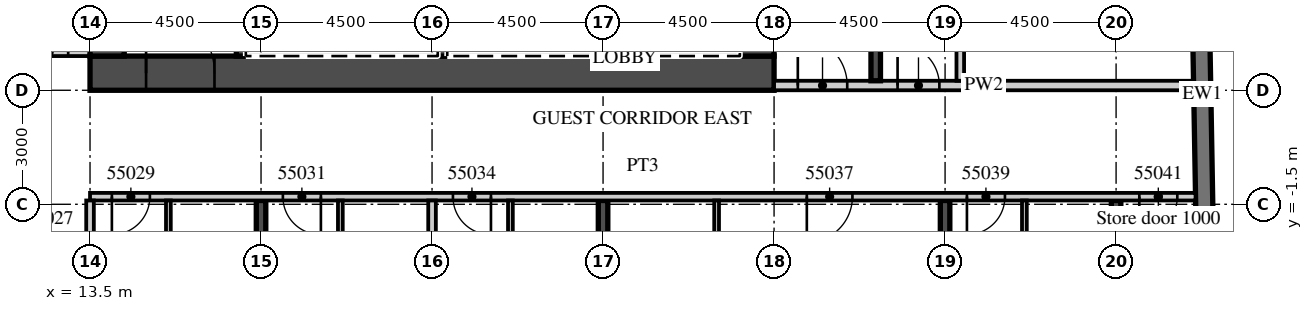
"""IFC4 building model, lengths in metres.
Left out: names, types, materials, properties, quantities, classifications, styles, units other than length and angle.
Written with IfcOpenShell. Run it as: python <this file> out.ifc"""

import sys

from ifc_helpers import new_model, si_unit, direction, frame, frame_2d, origin, place, context, subcontext, project, spatial, rectangle, extrude, element, fill, save


model = new_model("IFC4")
c1 = context("Model", 3, precision=1e-05, world=origin(), true_north=direction((0.0, 1.0)))
c2 = subcontext(c1, "Body", "Model", "MODEL_VIEW")
j1 = project(units=[si_unit("LENGTHUNIT", "METRE"), si_unit("PLANEANGLEUNIT", "RADIAN")], contexts=[c1])
p1 = place(None, origin())
s1 = spatial("IfcSite", under=j1, at=p1, CompositionType="ELEMENT")
p2 = place(p1, origin())
s2 = spatial("IfcBuilding", under=s1, at=p2, CompositionType="ELEMENT")
p3 = place(p2, frame((0.0, 0.0, 227.6)))
s3 = spatial("IfcBuildingStorey", under=s2, at=p3, CompositionType="ELEMENT", Elevation=227.6)
p4 = place(p3, frame((18.0, -19.079, 0.0), z_axis=(0.0, 0.0, 1.0), x_axis=(0.0, 1.0, 0.0)))
e1 = element("IfcWall", 1, at=p4, inside=s3, PredefinedType="SHEAR", context=c2, shape_type="SweptSolid", body=[
    extrude(rectangle(XDim=17.679, YDim=0.25, at=frame_2d((8.84, 0.0))), origin(), (0.0, 0.0, 1.0), 3.3),
])
p5 = place(p3, frame((27.0, -18.922, 0.0), z_axis=(0.0, 0.0, 1.0), x_axis=(0.0, 1.0, 0.0)))
e2 = element("IfcWall", 2, at=p5, inside=s3, PredefinedType="SHEAR", context=c2, shape_type="SweptSolid", body=[
    extrude(rectangle(XDim=17.522, YDim=0.25, at=frame_2d((8.761, 0.0))), origin(), (0.0, 0.0, 1.0), 3.3),
])
p6 = place(p3, frame((36.0, -18.765, 0.0), z_axis=(0.0, 0.0, 1.0), x_axis=(0.0, 1.0, 0.0)))
e3 = element("IfcWall", 3, at=p6, inside=s3, PredefinedType="SHEAR", context=c2, shape_type="SweptSolid", body=[
    extrude(rectangle(XDim=17.365, YDim=0.25, at=frame_2d((8.683, 0.0))), origin(), (0.0, 0.0, 1.0), 3.3),
])
p7 = place(p3, frame((40.5, -18.325, 0.0), z_axis=(0.0, 0.0, 1.0), x_axis=(0.0, 1.0, 0.0)))
e4 = element("IfcWall", 4, at=p7, inside=s3, PredefinedType="SHEAR", context=c2, shape_type="SweptSolid", body=[
    extrude(rectangle(XDim=16.925, YDim=0.25, at=frame_2d((8.463, 0.0))), origin(), (0.0, 0.0, 1.0), 3.3),
])
p8 = place(p3, frame((43.057, -15.103, 0.0), z_axis=(0.0, 0.0, 1.0), x_axis=(-0.017452408953, 0.999847695112, 0.0)))
e5 = element("IfcWall", 5, at=p8, inside=s3, PredefinedType="SOLIDWALL", context=c2, shape_type="SweptSolid", body=[
    extrude(rectangle(XDim=33.0, YDim=0.45, at=frame_2d((16.5, 0.0))), origin(), (0.0, 0.0, 1.0), 3.02),
])
p9 = place(p3, frame((-13.5, 2.5, 0.0), z_axis=(0.0, 0.0, 1.0), x_axis=(1.0, 0.0, 0.0)))
e6 = element("IfcWall", 6, at=p9, inside=s3, PredefinedType="PARTITIONING", context=c2, shape_type="SweptSolid", body=[
    extrude(rectangle(XDim=27.0, YDim=0.2, at=frame_2d((13.5, 0.0))), origin(), (0.0, 0.0, 1.0), 3.02),
])
p10 = place(p9, frame((2.925, 0.0, 0.0)))
e7 = element("IfcOpeningElement", 7, at=p10, cuts=e6, PredefinedType="OPENING", context=c2, shape_type="SweptSolid", body=[
    extrude(rectangle(XDim=1.0, YDim=2.1, at=frame_2d((0.5, 1.05))), frame((0.0, 0.11, 0.0), z_axis=(0.0, -1.0, 0.0), x_axis=(1.0, 0.0, 0.0)), (0.0, 0.0, 1.0), 0.22),
])
p11 = place(p9, frame((6.938, 0.0, 0.0)))
e8 = element("IfcOpeningElement", 8, at=p11, cuts=e6, PredefinedType="OPENING", context=c2, shape_type="SweptSolid", body=[
    extrude(rectangle(XDim=1.2, YDim=2.1, at=frame_2d((0.6, 1.05))), frame((0.0, 0.11, 0.0), z_axis=(0.0, -1.0, 0.0), x_axis=(1.0, 0.0, 0.0)), (0.0, 0.0, 1.0), 0.22),
])
p12 = place(p9, frame((14.075, 0.0, 0.0)))
e9 = element("IfcOpeningElement", 9, at=p12, cuts=e6, PredefinedType="OPENING", context=c2, shape_type="SweptSolid", body=[
    extrude(rectangle(XDim=1.0, YDim=2.1, at=frame_2d((0.5, 1.05))), frame((0.0, 0.11, 0.0), z_axis=(0.0, -1.0, 0.0), x_axis=(1.0, 0.0, 0.0)), (0.0, 0.0, 1.0), 0.22),
])
p13 = place(p9, frame((20.925, 0.0, 0.0)))
e10 = element("IfcOpeningElement", 10, at=p13, cuts=e6, PredefinedType="OPENING", context=c2, shape_type="SweptSolid", body=[
    extrude(rectangle(XDim=1.0, YDim=2.1, at=frame_2d((0.5, 1.05))), frame((0.0, 0.11, 0.0), z_axis=(0.0, -1.0, 0.0), x_axis=(1.0, 0.0, 0.0)), (0.0, 0.0, 1.0), 0.22),
])
p14 = place(p9, frame((25.425, 0.0, 0.0)))
e11 = element("IfcOpeningElement", 11, at=p14, cuts=e6, PredefinedType="OPENING", context=c2, shape_type="SweptSolid", body=[
    extrude(rectangle(XDim=1.0, YDim=2.1, at=frame_2d((0.5, 1.05))), frame((0.0, 0.11, 0.0), z_axis=(0.0, -1.0, 0.0), x_axis=(1.0, 0.0, 0.0)), (0.0, 0.0, 1.0), 0.22),
])
p15 = place(p3, frame((13.5, -1.3, 0.0), z_axis=(0.0, 0.0, 1.0), x_axis=(1.0, 0.0, 0.0)))
e12 = element("IfcWall", 12, at=p15, inside=s3, PredefinedType="PARTITIONING", context=c2, shape_type="SweptSolid", body=[
    extrude(rectangle(XDim=29.091, YDim=0.2, at=frame_2d((14.545, 0.0))), origin(), (0.0, 0.0, 1.0), 3.02),
])
p16 = place(p15, frame((0.575, 0.0, 0.0)))
e13 = element("IfcOpeningElement", 13, at=p16, cuts=e12, PredefinedType="OPENING", context=c2, shape_type="SweptSolid", body=[
    extrude(rectangle(XDim=1.0, YDim=2.1, at=frame_2d((0.5, 1.05))), frame((0.0, 0.11, 0.0), z_axis=(0.0, -1.0, 0.0), x_axis=(1.0, 0.0, 0.0)), (0.0, 0.0, 1.0), 0.22),
])
p17 = place(p15, frame((5.075, 0.0, 0.0)))
e14 = element("IfcOpeningElement", 14, at=p17, cuts=e12, PredefinedType="OPENING", context=c2, shape_type="SweptSolid", body=[
    extrude(rectangle(XDim=1.0, YDim=2.1, at=frame_2d((0.5, 1.05))), frame((0.0, 0.11, 0.0), z_axis=(0.0, -1.0, 0.0), x_axis=(1.0, 0.0, 0.0)), (0.0, 0.0, 1.0), 0.22),
])
p18 = place(p15, frame((9.55, 0.0, 0.0)))
e15 = element("IfcOpeningElement", 15, at=p18, cuts=e12, PredefinedType="OPENING", context=c2, shape_type="SweptSolid", body=[
    extrude(rectangle(XDim=1.0, YDim=2.1, at=frame_2d((0.5, 1.05))), frame((0.0, 0.11, 0.0), z_axis=(0.0, -1.0, 0.0), x_axis=(1.0, 0.0, 0.0)), (0.0, 0.0, 1.0), 0.22),
])
p19 = place(p15, frame((18.862, 0.0, 0.0)))
e16 = element("IfcOpeningElement", 16, at=p19, cuts=e12, PredefinedType="OPENING", context=c2, shape_type="SweptSolid", body=[
    extrude(rectangle(XDim=1.2, YDim=2.1, at=frame_2d((0.6, 1.05))), frame((0.0, 0.11, 0.0), z_axis=(0.0, -1.0, 0.0), x_axis=(1.0, 0.0, 0.0)), (0.0, 0.0, 1.0), 0.22),
])
p20 = place(p15, frame((23.075, 0.0, 0.0)))
e17 = element("IfcOpeningElement", 17, at=p20, cuts=e12, PredefinedType="OPENING", context=c2, shape_type="SweptSolid", body=[
    extrude(rectangle(XDim=1.0, YDim=2.1, at=frame_2d((0.5, 1.05))), frame((0.0, 0.11, 0.0), z_axis=(0.0, -1.0, 0.0), x_axis=(1.0, 0.0, 0.0)), (0.0, 0.0, 1.0), 0.22),
])
p21 = place(p15, frame((27.611, 0.0, 0.0)))
e18 = element("IfcOpeningElement", 18, at=p21, cuts=e12, PredefinedType="OPENING", context=c2, shape_type="SweptSolid", body=[
    extrude(rectangle(XDim=1.0, YDim=2.4, at=frame_2d((0.5, 1.2))), frame((0.0, 0.11, 0.0), z_axis=(0.0, -1.0, 0.0), x_axis=(1.0, 0.0, 0.0)), (0.0, 0.0, 1.0), 0.22),
])
p22 = place(p3, frame((13.5, -19.17, 0.0), z_axis=(0.0, 0.0, 1.0), x_axis=(0.0, 1.0, 0.0)))
e19 = element("IfcWall", 19, at=p22, inside=s3, PredefinedType="PARTITIONING", context=c2, shape_type="SweptSolid", body=[
    extrude(rectangle(XDim=17.77, YDim=0.2, at=frame_2d((8.885, 0.0))), origin(), (0.0, 0.0, 1.0), 3.02),
])
p23 = place(p3, frame((15.562, -7.125, 0.0), z_axis=(0.0, 0.0, 1.0), x_axis=(0.0, 1.0, 0.0)))
e20 = element("IfcWall", 20, at=p23, inside=s3, PredefinedType="PARTITIONING", context=c2, shape_type="SweptSolid", body=[
    extrude(rectangle(XDim=5.725, YDim=0.125, at=frame_2d((2.863, 0.0))), origin(), (0.0, 0.0, 1.0), 3.02),
])
p24 = place(p23, frame((2.375, 0.0, 0.0)))
e21 = element("IfcOpeningElement", 21, at=p24, cuts=e20, PredefinedType="OPENING", context=c2, shape_type="SweptSolid", body=[
    extrude(rectangle(XDim=0.9, YDim=2.1, at=frame_2d((0.45, 1.05))), frame((0.0, 0.073, 0.0), z_axis=(0.0, -1.0, 0.0), x_axis=(1.0, 0.0, 0.0)), (0.0, 0.0, 1.0), 0.145),
])
p25 = place(p3, frame((22.5, -19.013, 0.0), z_axis=(0.0, 0.0, 1.0), x_axis=(0.0, 1.0, 0.0)))
e22 = element("IfcWall", 22, at=p25, inside=s3, PredefinedType="PARTITIONING", context=c2, shape_type="SweptSolid", body=[
    extrude(rectangle(XDim=17.613, YDim=0.2, at=frame_2d((8.807, 0.0))), origin(), (0.0, 0.0, 1.0), 3.02),
])
p26 = place(p3, frame((20.087, -7.125, 0.0), z_axis=(0.0, 0.0, 1.0), x_axis=(0.0, 1.0, 0.0)))
e23 = element("IfcWall", 23, at=p26, inside=s3, PredefinedType="PARTITIONING", context=c2, shape_type="SweptSolid", body=[
    extrude(rectangle(XDim=5.725, YDim=0.125, at=frame_2d((2.863, 0.0))), origin(), (0.0, 0.0, 1.0), 3.02),
])
p27 = place(p26, frame((2.375, 0.0, 0.0)))
e24 = element("IfcOpeningElement", 24, at=p27, cuts=e23, PredefinedType="OPENING", context=c2, shape_type="SweptSolid", body=[
    extrude(rectangle(XDim=0.9, YDim=2.1, at=frame_2d((0.45, 1.05))), frame((0.0, 0.073, 0.0), z_axis=(0.0, -1.0, 0.0), x_axis=(1.0, 0.0, 0.0)), (0.0, 0.0, 1.0), 0.145),
])
p28 = place(p3, frame((24.562, -7.125, 0.0), z_axis=(0.0, 0.0, 1.0), x_axis=(0.0, 1.0, 0.0)))
e25 = element("IfcWall", 25, at=p28, inside=s3, PredefinedType="PARTITIONING", context=c2, shape_type="SweptSolid", body=[
    extrude(rectangle(XDim=5.725, YDim=0.125, at=frame_2d((2.863, 0.0))), origin(), (0.0, 0.0, 1.0), 3.02),
])
p29 = place(p28, frame((2.375, 0.0, 0.0)))
e26 = element("IfcOpeningElement", 26, at=p29, cuts=e25, PredefinedType="OPENING", context=c2, shape_type="SweptSolid", body=[
    extrude(rectangle(XDim=0.9, YDim=2.1, at=frame_2d((0.45, 1.05))), frame((0.0, 0.073, 0.0), z_axis=(0.0, -1.0, 0.0), x_axis=(1.0, 0.0, 0.0)), (0.0, 0.0, 1.0), 0.145),
])
p30 = place(p3, frame((29.988, -7.125, 0.0), z_axis=(0.0, 0.0, 1.0), x_axis=(0.0, 1.0, 0.0)))
e27 = element("IfcWall", 27, at=p30, inside=s3, PredefinedType="PARTITIONING", context=c2, shape_type="SweptSolid", body=[
    extrude(rectangle(XDim=5.725, YDim=0.125, at=frame_2d((2.863, 0.0))), origin(), (0.0, 0.0, 1.0), 3.02),
])
p31 = place(p30, frame((2.375, 0.0, 0.0)))
e28 = element("IfcOpeningElement", 28, at=p31, cuts=e27, PredefinedType="OPENING", context=c2, shape_type="SweptSolid", body=[
    extrude(rectangle(XDim=0.9, YDim=2.1, at=frame_2d((0.45, 1.05))), frame((0.0, 0.073, 0.0), z_axis=(0.0, -1.0, 0.0), x_axis=(1.0, 0.0, 0.0)), (0.0, 0.0, 1.0), 0.145),
])
p32 = place(p3, frame((38.087, -7.125, 0.0), z_axis=(0.0, 0.0, 1.0), x_axis=(0.0, 1.0, 0.0)))
e29 = element("IfcWall", 29, at=p32, inside=s3, PredefinedType="PARTITIONING", context=c2, shape_type="SweptSolid", body=[
    extrude(rectangle(XDim=5.725, YDim=0.125, at=frame_2d((2.863, 0.0))), origin(), (0.0, 0.0, 1.0), 3.02),
])
p33 = place(p32, frame((2.375, 0.0, 0.0)))
e30 = element("IfcOpeningElement", 30, at=p33, cuts=e29, PredefinedType="OPENING", context=c2, shape_type="SweptSolid", body=[
    extrude(rectangle(XDim=0.9, YDim=2.1, at=frame_2d((0.45, 1.05))), frame((0.0, 0.073, 0.0), z_axis=(0.0, -1.0, 0.0), x_axis=(1.0, 0.0, 0.0)), (0.0, 0.0, 1.0), 0.145),
])
p34 = place(p3, frame((13.5, 1.95, 0.0), z_axis=(0.0, 0.0, 1.0), x_axis=(1.0, 0.0, 0.0)))
e31 = element("IfcWall", 31, at=p34, inside=s3, PredefinedType="SHEAR", context=c2, shape_type="SweptSolid", body=[
    extrude(rectangle(XDim=18.0, YDim=0.9, at=frame_2d((9.0, 0.0))), origin(), (0.0, 0.0, 1.0), 3.02),
])
p35 = place(p34, frame((1.475, 0.0, 0.0)))
e32 = element("IfcOpeningElement", 32, at=p35, cuts=e31, PredefinedType="OPENING", context=c2, shape_type="SweptSolid", body=[
    extrude(rectangle(XDim=1.8, YDim=2.1, at=frame_2d((0.9, 1.05))), frame((0.0, 0.46, 0.0), z_axis=(0.0, -1.0, 0.0), x_axis=(1.0, 0.0, 0.0)), (0.0, 0.0, 1.0), 0.92),
])
p36 = place(p3, frame((31.05, 2.4, 0.0), z_axis=(0.0, 0.0, 1.0), x_axis=(0.0, 1.0, 0.0)))
e33 = element("IfcWall", 33, at=p36, inside=s3, PredefinedType="SHEAR", context=c2, shape_type="SweptSolid", body=[
    extrude(rectangle(XDim=12.8, YDim=0.9, at=frame_2d((6.4, 0.0))), origin(), (0.0, 0.0, 1.0), 3.02),
])
p37 = place(p36, frame((0.2, 0.0, 0.0)))
e34 = element("IfcOpeningElement", 34, at=p37, cuts=e33, PredefinedType="OPENING", context=c2, shape_type="SweptSolid", body=[
    extrude(rectangle(XDim=1.1, YDim=2.1, at=frame_2d((0.55, 1.05))), frame((0.0, 0.46, 0.0), z_axis=(0.0, -1.0, 0.0), x_axis=(1.0, 0.0, 0.0)), (0.0, 0.0, 1.0), 0.92),
])
p38 = place(p3, frame((13.95, 2.4, 0.0), z_axis=(0.0, 0.0, 1.0), x_axis=(0.0, 1.0, 0.0)))
e35 = element("IfcWall", 35, at=p38, inside=s3, PredefinedType="SHEAR", context=c2, shape_type="SweptSolid", body=[
    extrude(rectangle(XDim=12.2, YDim=0.9, at=frame_2d((6.1, 0.0))), origin(), (0.0, 0.0, 1.0), 3.02),
])
p39 = place(p3, frame((17.475, 2.4, 0.0), z_axis=(0.0, 0.0, 1.0), x_axis=(0.0, 1.0, 0.0)))
e36 = element("IfcWall", 36, at=p39, inside=s3, PredefinedType="SHEAR", context=c2, shape_type="SweptSolid", body=[
    extrude(rectangle(XDim=3.15, YDim=0.25, at=frame_2d((1.575, 0.0))), origin(), (0.0, 0.0, 1.0), 3.02),
])
for number, where, z_axis, x_axis in (
    (37, (27.975, 2.4, 0.0), (0.0, 0.0, 1.0), (0.0, 1.0, 0.0)),
    (38, (22.775, 2.4, 0.0), (0.0, 0.0, 1.0), (0.0, 1.0, 0.0)),
):
    element("IfcWall", number, at=place(p3, frame(where, z_axis=z_axis, x_axis=x_axis)), inside=s3, PredefinedType="SHEAR", context=c2, shape_type="SweptSolid", body=[
        extrude(rectangle(XDim=2.9, YDim=0.25, at=frame_2d((1.45, 0.0))), origin(), (0.0, 0.0, 1.0), 3.02),
    ])
p40 = place(p3, frame((31.5, 1.625, 0.0), z_axis=(0.0, 0.0, 1.0), x_axis=(1.0, 0.0, 0.0)))
e39 = element("IfcWall", 39, at=p40, inside=s3, PredefinedType="PARTITIONING", context=c2, shape_type="SweptSolid", body=[
    extrude(rectangle(XDim=11.04, YDim=0.25, at=frame_2d((5.52, 0.0))), origin(), (0.0, 0.0, 1.0), 3.02),
])
p41 = place(p40, frame((0.625, 0.0, 0.0)))
e40 = element("IfcOpeningElement", 40, at=p41, cuts=e39, PredefinedType="OPENING", context=c2, shape_type="SweptSolid", body=[
    extrude(rectangle(XDim=1.3, YDim=2.1, at=frame_2d((0.65, 1.05))), frame((0.0, 0.135, 0.0), z_axis=(0.0, -1.0, 0.0), x_axis=(1.0, 0.0, 0.0)), (0.0, 0.0, 1.0), 0.27),
])
p42 = place(p40, frame((3.25, 0.0, 0.0)))
e41 = element("IfcOpeningElement", 41, at=p42, cuts=e39, PredefinedType="OPENING", context=c2, shape_type="SweptSolid", body=[
    extrude(rectangle(XDim=1.1, YDim=2.1, at=frame_2d((0.55, 1.05))), frame((0.0, 0.135, 0.0), z_axis=(0.0, -1.0, 0.0), x_axis=(1.0, 0.0, 0.0)), (0.0, 0.0, 1.0), 0.27),
])
p43 = place(p3, frame((34.175, 1.75, 0.0), z_axis=(0.0, 0.0, 1.0), x_axis=(0.0, 1.0, 0.0)))
e42 = element("IfcWall", 42, at=p43, inside=s3, PredefinedType="SHEAR", context=c2, shape_type="SweptSolid", body=[
    extrude(rectangle(XDim=8.35, YDim=0.25, at=frame_2d((4.175, 0.0))), origin(), (0.0, 0.0, 1.0), 3.02),
])
p44 = place(p3, frame((36.4, 1.75, 0.0), z_axis=(0.0, 0.0, 1.0), x_axis=(0.0, 1.0, 0.0)))
e43 = element("IfcWall", 43, at=p44, inside=s3, PredefinedType="PARTITIONING", context=c2, shape_type="SweptSolid", body=[
    extrude(rectangle(XDim=15.95, YDim=0.2, at=frame_2d((7.975, 0.0))), origin(), (0.0, 0.0, 1.0), 3.02),
])
p45 = place(p44, frame((14.7, 0.0, 0.0)))
e44 = element("IfcOpeningElement", 44, at=p45, cuts=e43, PredefinedType="OPENING", context=c2, shape_type="SweptSolid", body=[
    extrude(rectangle(XDim=0.9, YDim=2.1, at=frame_2d((0.45, 1.05))), frame((0.0, 0.11, 0.0), z_axis=(0.0, -1.0, 0.0), x_axis=(1.0, 0.0, 0.0)), (0.0, 0.0, 1.0), 0.22),
])
p46 = place(p14, origin())
e45 = element("IfcDoor", 45, at=p46, inside=s3, OperationType="SINGLE_SWING_RIGHT", PredefinedType="DOOR", context=c2, shape_type="SweptSolid", body=[
    extrude(rectangle(XDim=1.0, YDim=2.1, at=frame_2d((0.5, 1.05))), frame((0.0, 0.025, 0.0), z_axis=(0.0, -1.0, 0.0), x_axis=(1.0, 0.0, 0.0)), (0.0, 0.0, 1.0), 0.05),
])
fill(e11, e45)
p47 = place(p16, origin())
e46 = element("IfcDoor", 46, at=p47, inside=s3, OperationType="SINGLE_SWING_LEFT", PredefinedType="DOOR", context=c2, shape_type="SweptSolid", body=[
    extrude(rectangle(XDim=1.0, YDim=2.1, at=frame_2d((0.5, 1.05))), frame((0.0, 0.025, 0.0), z_axis=(0.0, -1.0, 0.0), x_axis=(1.0, 0.0, 0.0)), (0.0, 0.0, 1.0), 0.05),
])
fill(e13, e46)
p48 = place(p17, origin())
e47 = element("IfcDoor", 47, at=p48, inside=s3, OperationType="SINGLE_SWING_RIGHT", PredefinedType="DOOR", context=c2, shape_type="SweptSolid", body=[
    extrude(rectangle(XDim=1.0, YDim=2.1, at=frame_2d((0.5, 1.05))), frame((0.0, 0.025, 0.0), z_axis=(0.0, -1.0, 0.0), x_axis=(1.0, 0.0, 0.0)), (0.0, 0.0, 1.0), 0.05),
])
fill(e14, e47)
p49 = place(p18, origin())
e48 = element("IfcDoor", 48, at=p49, inside=s3, OperationType="SINGLE_SWING_RIGHT", PredefinedType="DOOR", context=c2, shape_type="SweptSolid", body=[
    extrude(rectangle(XDim=1.0, YDim=2.1, at=frame_2d((0.5, 1.05))), frame((0.0, 0.025, 0.0), z_axis=(0.0, -1.0, 0.0), x_axis=(1.0, 0.0, 0.0)), (0.0, 0.0, 1.0), 0.05),
])
fill(e15, e48)
p50 = place(p19, origin())
e49 = element("IfcDoor", 49, at=p50, inside=s3, OperationType="SINGLE_SWING_LEFT", PredefinedType="DOOR", context=c2, shape_type="SweptSolid", body=[
    extrude(rectangle(XDim=1.2, YDim=2.1, at=frame_2d((0.6, 1.05))), frame((0.0, 0.025, 0.0), z_axis=(0.0, -1.0, 0.0), x_axis=(1.0, 0.0, 0.0)), (0.0, 0.0, 1.0), 0.05),
])
fill(e16, e49)
p51 = place(p20, origin())
e50 = element("IfcDoor", 50, at=p51, inside=s3, OperationType="SINGLE_SWING_LEFT", PredefinedType="DOOR", context=c2, shape_type="SweptSolid", body=[
    extrude(rectangle(XDim=1.0, YDim=2.1, at=frame_2d((0.5, 1.05))), frame((0.0, 0.025, 0.0), z_axis=(0.0, -1.0, 0.0), x_axis=(1.0, 0.0, 0.0)), (0.0, 0.0, 1.0), 0.05),
])
fill(e17, e50)
p52 = place(p21, origin())
e51 = element("IfcDoor", 51, at=p52, inside=s3, OperationType="SINGLE_SWING_LEFT", PredefinedType="DOOR", context=c2, shape_type="SweptSolid", body=[
    extrude(rectangle(XDim=1.0, YDim=2.4, at=frame_2d((0.5, 1.2))), frame((0.0, 0.025, 0.0), z_axis=(0.0, -1.0, 0.0), x_axis=(1.0, 0.0, 0.0)), (0.0, 0.0, 1.0), 0.05),
])
fill(e18, e51)
p53 = place(p35, origin())
e52 = element("IfcDoor", 52, at=p53, inside=s3, OperationType="DOUBLE_DOOR_DOUBLE_SWING", PredefinedType="DOOR", context=c2, shape_type="SweptSolid", body=[
    extrude(rectangle(XDim=1.8, YDim=2.1, at=frame_2d((0.9, 1.05))), frame((0.0, 0.025, 0.0), z_axis=(0.0, -1.0, 0.0), x_axis=(1.0, 0.0, 0.0)), (0.0, 0.0, 1.0), 0.05),
])
fill(e32, e52)
p54 = place(p41, origin())
e53 = element("IfcDoor", 53, at=p54, inside=s3, OperationType="SINGLE_SWING_LEFT", PredefinedType="DOOR", context=c2, shape_type="SweptSolid", body=[
    extrude(rectangle(XDim=1.3, YDim=2.1, at=frame_2d((0.65, 1.05))), frame((0.0, 0.025, 0.0), z_axis=(0.0, -1.0, 0.0), x_axis=(1.0, 0.0, 0.0)), (0.0, 0.0, 1.0), 0.05),
])
fill(e40, e53)
p55 = place(p42, origin())
e54 = element("IfcDoor", 54, at=p55, inside=s3, OperationType="SINGLE_SWING_LEFT", PredefinedType="DOOR", context=c2, shape_type="SweptSolid", body=[
    extrude(rectangle(XDim=1.1, YDim=2.1, at=frame_2d((0.55, 1.05))), frame((0.0, 0.025, 0.0), z_axis=(0.0, -1.0, 0.0), x_axis=(1.0, 0.0, 0.0)), (0.0, 0.0, 1.0), 0.05),
])
fill(e41, e54)
save(model, sys.argv[1])
